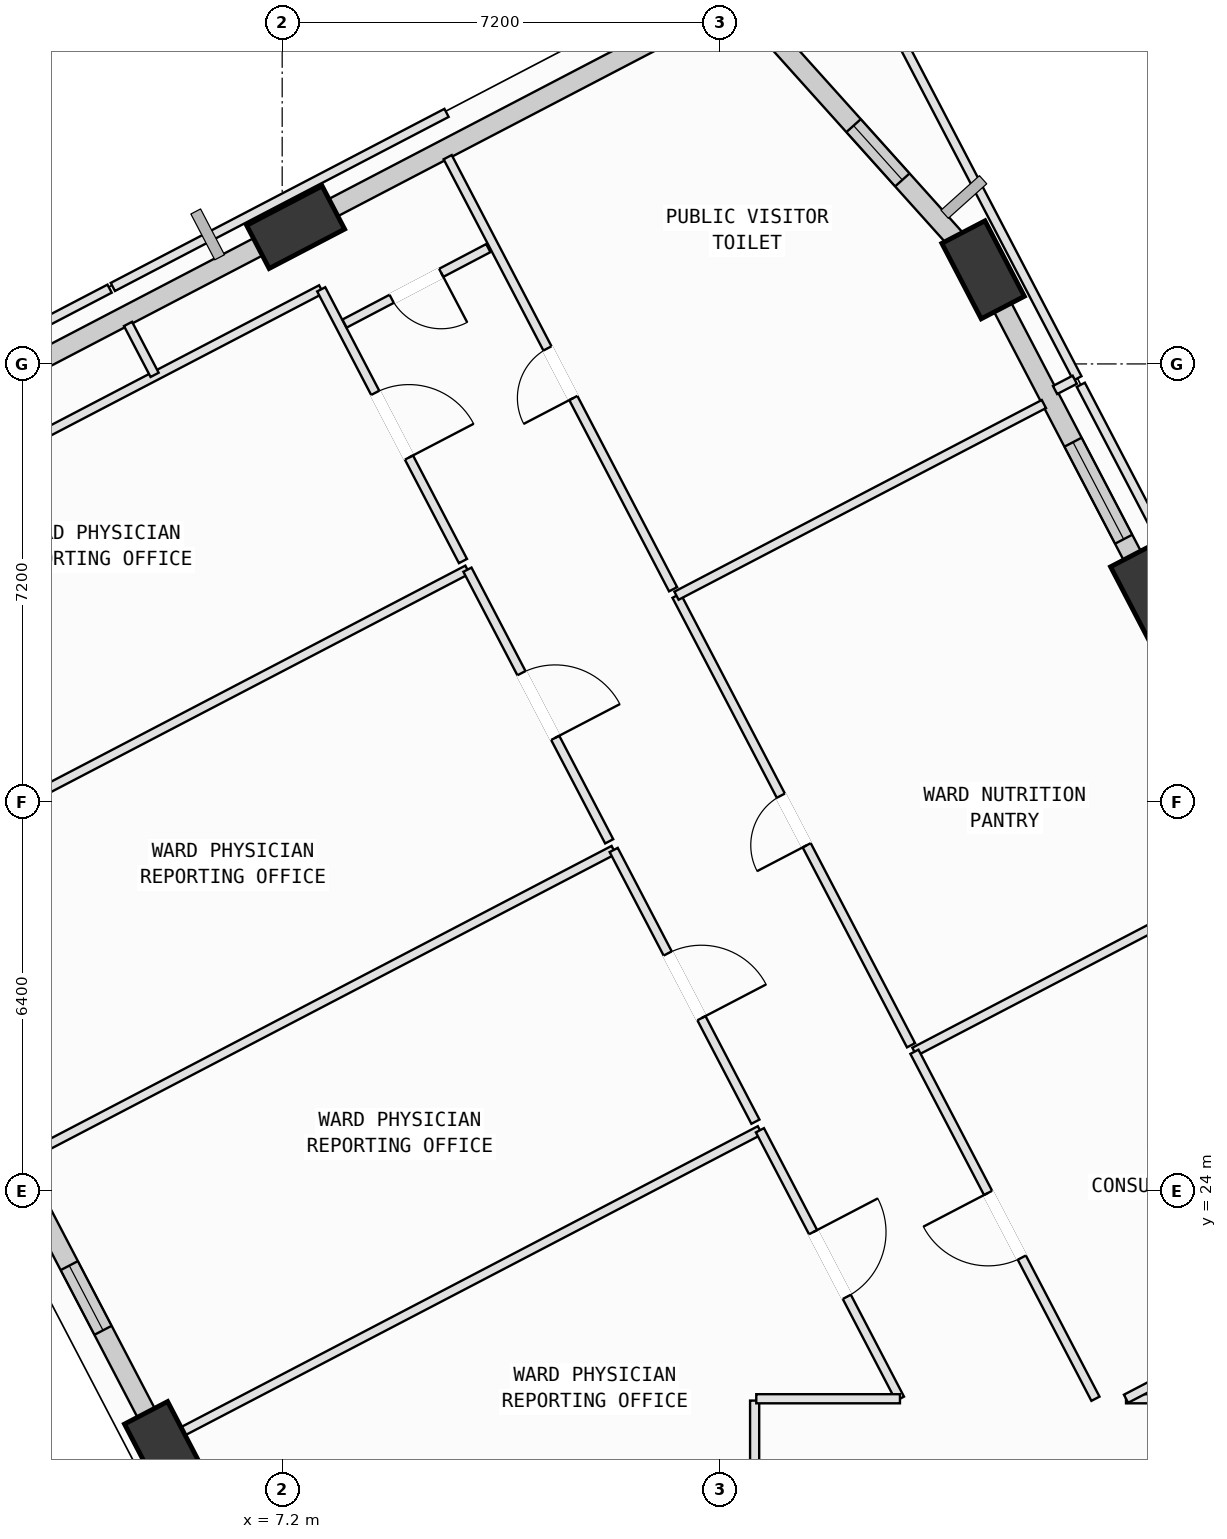
"""IFC4 building model, lengths in metres.
Left out: names, types, materials, properties, quantities, classifications, styles, units other than length and angle.
Written with IfcOpenShell. Run it as: python <this file> out.ifc"""

import sys

from ifc_helpers import new_model, si_unit, direction, frame, frame_2d, origin, origin_2d, place, context, subcontext, project, spatial, rectangle, extrude, element, fill, save


model = new_model("IFC4")
c1 = context("Model", 3, precision=1e-05, world=origin(), true_north=direction((0.0, 1.0)))
c2 = subcontext(c1, "Body", "Model", "MODEL_VIEW")
j1 = project(units=[si_unit("LENGTHUNIT", "METRE"), si_unit("PLANEANGLEUNIT", "RADIAN")], contexts=[c1])
p1 = place(None, origin())
s1 = spatial("IfcSite", under=j1, at=p1, CompositionType="ELEMENT")
p2 = place(p1, origin())
s2 = spatial("IfcBuilding", under=s1, at=p2, CompositionType="ELEMENT")
p3 = place(p2, frame((0.0, 0.0, 140.4)))
s3 = spatial("IfcBuildingStorey", under=s2, at=p3, CompositionType="ELEMENT", Elevation=140.4)
p4 = place(p3, frame((21.502, 33.828, 0.002), z_axis=(-0.036932649589, -0.050396391412, 0.998046182863), x_axis=(0.149987895413, 0.987134715444, 0.055395710969)))
e1 = element("IfcColumn", 1, at=p4, inside=s3, PredefinedType="COLUMN", context=c2, shape_type="SweptSolid", body=[
    extrude(rectangle(XDim=1.4, YDim=0.8, at=origin_2d()), origin(), (0.0, 0.0, 1.0), 3.953),
])
p5 = place(p3, frame((18.727, 39.148, 0.002), z_axis=(-0.058783551583, -0.061942625482, 0.996347130879), x_axis=(0.272586926496, 0.959147545124, 0.075712311991)))
e2 = element("IfcColumn", 2, at=p5, inside=s3, PredefinedType="COLUMN", context=c2, shape_type="SweptSolid", body=[
    extrude(rectangle(XDim=1.4, YDim=0.8, at=origin_2d()), origin(), (0.0, 0.0, 1.0), 3.941),
])
p6 = place(p3, frame((7.421, 39.848, 0.002), z_axis=(-0.06100607157, -0.108138681178, 0.992262205702), x_axis=(0.9977035928, -0.035912424695, 0.057426811397)))
e3 = element("IfcColumn", 3, at=p6, inside=s3, PredefinedType="COLUMN", context=c2, shape_type="SweptSolid", body=[
    extrude(rectangle(XDim=1.4, YDim=0.8, at=origin_2d()), origin(), (0.0, 0.0, 1.0), 3.942),
])
p7 = place(p3, frame((5.285, 19.728, 0.002), z_axis=(0.021879443382, -0.116358857988, 0.992966216004), x_axis=(-0.617245268463, 0.779736515973, 0.104972587944)))
e4 = element("IfcColumn", 4, at=p7, inside=s3, PredefinedType="COLUMN", context=c2, shape_type="SweptSolid", body=[
    extrude(rectangle(XDim=1.4, YDim=0.8, at=origin_2d()), origin(), (0.0, 0.0, 1.0), 3.928),
])
p8 = place(p3, frame((18.97, 38.683, 0.0), z_axis=(0.0, 0.0, 1.0), x_axis=(0.462529637731, -0.886603820328, 0.0)))
e5 = element("IfcWall", 5, at=p8, inside=s3, PredefinedType="SOLIDWALL", context=c2, shape_type="SweptSolid", body=[
    extrude(rectangle(XDim=5.047, YDim=0.32, at=frame_2d((2.523, 0.0))), origin(), (0.0, 0.0, 1.0), 3.085),
])
p9 = place(p8, frame((2.673, 0.0, 0.75)))
e6 = element("IfcOpeningElement", 6, at=p9, cuts=e5, PredefinedType="OPENING", context=c2, shape_type="SweptSolid", body=[
    extrude(rectangle(XDim=1.8, YDim=2.05, at=frame_2d((0.9, 1.025))), frame((0.0, 0.17, 0.0), z_axis=(0.0, -1.0, 0.0), x_axis=(1.0, 0.0, 0.0)), (0.0, 0.0, 1.0), 0.34),
])
p10 = place(p3, frame((14.998, 43.3, 0.0), z_axis=(0.0, 0.0, 1.0), x_axis=(0.66822271705, -0.743961289596, 0.0)))
e7 = element("IfcWall", 7, at=p10, inside=s3, PredefinedType="SOLIDWALL", context=c2, shape_type="SweptSolid", body=[
    extrude(rectangle(XDim=5.128, YDim=0.32, at=frame_2d((2.564, 0.0))), origin(), (0.0, 0.0, 1.0), 3.085),
])
p11 = place(p10, frame((2.393, 0.0, 0.75)))
e8 = element("IfcOpeningElement", 8, at=p11, cuts=e7, PredefinedType="OPENING", context=c2, shape_type="SweptSolid", body=[
    extrude(rectangle(XDim=1.2, YDim=1.75, at=frame_2d((0.6, 0.875))), frame((0.0, 0.17, 0.0), z_axis=(0.0, -1.0, 0.0), x_axis=(1.0, 0.0, 0.0)), (0.0, 0.0, 1.0), 0.34),
])
p12 = place(p3, frame((7.658, 39.972, 0.0), z_axis=(0.0, 0.0, 1.0), x_axis=(0.886603508344, 0.462530235759, 0.0)))
e9 = element("IfcWall", 9, at=p12, inside=s3, PredefinedType="SOLIDWALL", context=c2, shape_type="SweptSolid", body=[
    extrude(rectangle(XDim=7.231, YDim=0.32, at=frame_2d((3.615, 0.0))), origin(), (0.0, 0.0, 1.0), 3.085),
])
p13 = place(p3, frame((0.367, 36.168, 0.0), z_axis=(0.0, 0.0, 1.0), x_axis=(0.886598018627, 0.4625407586, 0.0)))
e10 = element("IfcWall", 10, at=p13, inside=s3, PredefinedType="SOLIDWALL", context=c2, shape_type="SweptSolid", body=[
    extrude(rectangle(XDim=7.27, YDim=0.32, at=frame_2d((3.635, 0.0))), origin(), (0.0, 0.0, 1.0), 3.085),
])
p14 = place(p3, frame((5.163, 19.962, 0.0), z_axis=(0.0, 0.0, 1.0), x_axis=(-0.462505217962, 0.886616559375, 0.0)))
e11 = element("IfcWall", 11, at=p14, inside=s3, PredefinedType="SOLIDWALL", context=c2, shape_type="SweptSolid", body=[
    extrude(rectangle(XDim=5.628, YDim=0.32, at=frame_2d((2.814, 0.0))), origin(), (0.0, 0.0, 1.0), 3.085),
])
p15 = place(p14, frame((1.967, 0.0, 0.75)))
e12 = element("IfcOpeningElement", 12, at=p15, cuts=e11, PredefinedType="OPENING", context=c2, shape_type="SweptSolid", body=[
    extrude(rectangle(XDim=1.2, YDim=1.75, at=frame_2d((0.6, 0.875))), frame((0.0, 0.17, 0.0), z_axis=(0.0, -1.0, 0.0), x_axis=(1.0, 0.0, 0.0)), (0.0, 0.0, 1.0), 0.34),
])
p16 = place(p3, frame((14.97, 20.55, 0.0), z_axis=(0.0, 0.0, 1.0), x_axis=(0.0, -1.0, 0.0)))
e13 = element("IfcWall", 13, at=p16, inside=s3, PredefinedType="PARTITIONING", context=c2, shape_type="SweptSolid", body=[
    extrude(rectangle(XDim=1.284, YDim=0.15, at=frame_2d((0.642, 0.0))), origin(), (0.0, 0.0, 1.0), 2.885),
])
p17 = place(p3, frame((5.414, 18.984, 0.0), z_axis=(0.0, 0.0, 1.0), x_axis=(-0.462422071375, 0.886659927991, 0.0)))
e14 = element("IfcWall", 14, at=p17, inside=s3, PredefinedType="PARTITIONING", context=c2, shape_type="SweptSolid", body=[
    extrude(rectangle(XDim=0.87, YDim=0.15, at=frame_2d((0.435, 0.0))), origin(), (0.0, 0.0, 1.0), 3.085),
])
p18 = place(p3, frame((5.28, 19.895, 0.0), z_axis=(0.0, 0.0, 1.0), x_axis=(0.886580898603, 0.462573572777, 0.0)))
e15 = element("IfcWall", 15, at=p18, inside=s3, PredefinedType="PARTITIONING", context=c2, shape_type="SweptSolid", body=[
    extrude(rectangle(XDim=11.028, YDim=0.15, at=frame_2d((5.514, 0.0))), origin(), (0.0, 0.0, 1.0), 3.7),
])
p19 = place(p3, frame((15.057, 24.996, 0.0), z_axis=(0.0, 0.0, 1.0), x_axis=(0.462442035221, -0.886649515908, 0.0)))
e16 = element("IfcWall", 16, at=p19, inside=s3, PredefinedType="PARTITIONING", context=c2, shape_type="SweptSolid", body=[
    extrude(rectangle(XDim=4.98, YDim=0.15, at=frame_2d((2.49, 0.0))), origin(), (0.0, 0.0, 1.0), 3.7),
])
p20 = place(p19, frame((1.89, 0.0, 0.0)))
e17 = element("IfcOpeningElement", 17, at=p20, cuts=e16, PredefinedType="OPENING", context=c2, shape_type="SweptSolid", body=[
    extrude(rectangle(XDim=1.2, YDim=2.15, at=frame_2d((0.6, 1.075))), frame((0.0, 0.085, 0.0), z_axis=(0.0, -1.0, 0.0), x_axis=(1.0, 0.0, 0.0)), (0.0, 0.0, 1.0), 0.17),
])
p21 = place(p3, frame((17.36, 20.58, 0.0), z_axis=(0.0, 0.0, 1.0), x_axis=(-1.0, 0.0, 0.0)))
e18 = element("IfcWall", 18, at=p21, inside=s3, PredefinedType="PARTITIONING", context=c2, shape_type="SweptSolid", body=[
    extrude(rectangle(XDim=2.363, YDim=0.15, at=frame_2d((1.182, 0.0))), origin(), (0.0, 0.0, 1.0), 3.7),
])
p22 = place(p3, frame((2.93, 24.534, 0.0), z_axis=(0.0, 0.0, 1.0), x_axis=(0.886600327973, 0.462536332019, 0.0)))
e19 = element("IfcWall", 19, at=p22, inside=s3, PredefinedType="PARTITIONING", context=c2, shape_type="SweptSolid", body=[
    extrude(rectangle(XDim=10.966, YDim=0.15, at=frame_2d((5.483, 0.0))), origin(), (0.0, 0.0, 1.0), 3.285),
])
p23 = place(p3, frame((12.652, 29.606, 0.0), z_axis=(0.0, 0.0, 1.0), x_axis=(0.462435226927, -0.886653066817, 0.0)))
e20 = element("IfcWall", 20, at=p23, inside=s3, PredefinedType="PARTITIONING", context=c2, shape_type="SweptSolid", body=[
    extrude(rectangle(XDim=5.04, YDim=0.15, at=frame_2d((2.52, 0.0))), origin(), (0.0, 0.0, 1.0), 3.7),
])
p24 = place(p23, frame((1.92, 0.0, 0.0)))
e21 = element("IfcOpeningElement", 21, at=p24, cuts=e20, PredefinedType="OPENING", context=c2, shape_type="SweptSolid", body=[
    extrude(rectangle(XDim=1.2, YDim=2.15, at=frame_2d((0.6, 1.075))), frame((0.0, 0.085, 0.0), z_axis=(0.0, -1.0, 0.0), x_axis=(1.0, 0.0, 0.0)), (0.0, 0.0, 1.0), 0.17),
])
p25 = place(p3, frame((0.525, 29.145, 0.0), z_axis=(0.0, 0.0, 1.0), x_axis=(0.886636847368, 0.462466324059, 0.0)))
e22 = element("IfcWall", 22, at=p25, inside=s3, PredefinedType="PARTITIONING", context=c2, shape_type="SweptSolid", body=[
    extrude(rectangle(XDim=10.965, YDim=0.15, at=frame_2d((5.483, 0.0))), origin(), (0.0, 0.0, 1.0), 3.7),
])
p26 = place(p3, frame((10.247, 34.216, 0.0), z_axis=(0.0, 0.0, 1.0), x_axis=(0.462514680435, -0.886611623194, 0.0)))
e23 = element("IfcWall", 23, at=p26, inside=s3, PredefinedType="PARTITIONING", context=c2, shape_type="SweptSolid", body=[
    extrude(rectangle(XDim=5.04, YDim=0.15, at=frame_2d((2.52, 0.0))), origin(), (0.0, 0.0, 1.0), 3.7),
])
p27 = place(p26, frame((1.92, 0.0, 0.0)))
e24 = element("IfcOpeningElement", 24, at=p27, cuts=e23, PredefinedType="OPENING", context=c2, shape_type="SweptSolid", body=[
    extrude(rectangle(XDim=1.2, YDim=2.15, at=frame_2d((0.6, 1.075))), frame((0.0, 0.085, 0.0), z_axis=(0.0, -1.0, 0.0), x_axis=(1.0, 0.0, 0.0)), (0.0, 0.0, 1.0), 0.17),
])
p28 = place(p3, frame((0.052, 34.763, 0.0), z_axis=(0.0, 0.0, 1.0), x_axis=(0.88660367237, 0.462529921345, 0.0)))
e25 = element("IfcWall", 25, at=p28, inside=s3, PredefinedType="PARTITIONING", context=c2, shape_type="SweptSolid", body=[
    extrude(rectangle(XDim=8.786, YDim=0.15, at=frame_2d((4.393, 0.0))), origin(), (0.0, 0.0, 1.0), 3.7),
])
p29 = place(p3, frame((7.842, 38.827, 0.0), z_axis=(0.0, 0.0, 1.0), x_axis=(0.462473305165, -0.886633206016, 0.0)))
e26 = element("IfcWall", 26, at=p29, inside=s3, PredefinedType="PARTITIONING", context=c2, shape_type="SweptSolid", body=[
    extrude(rectangle(XDim=5.041, YDim=0.15, at=frame_2d((2.52, 0.0))), origin(), (0.0, 0.0, 1.0), 2.885),
])
p30 = place(p29, frame((1.92, 0.0, 0.0)))
e27 = element("IfcOpeningElement", 27, at=p30, cuts=e26, PredefinedType="OPENING", context=c2, shape_type="SweptSolid", body=[
    extrude(rectangle(XDim=1.2, YDim=2.15, at=frame_2d((0.6, 1.075))), frame((0.0, 0.085, 0.0), z_axis=(0.0, -1.0, 0.0), x_axis=(1.0, 0.0, 0.0)), (0.0, 0.0, 1.0), 0.17),
])
p31 = place(p3, frame((27.594, 20.58, 0.0), z_axis=(0.0, 0.0, 1.0), x_axis=(-1.0, 0.0, 0.0)))
e28 = element("IfcWall", 28, at=p31, inside=s3, PredefinedType="PARTITIONING", context=c2, shape_type="SweptSolid", body=[
    extrude(rectangle(XDim=6.516, YDim=0.15, at=frame_2d((3.258, 0.0))), origin(), (0.0, 0.0, 1.0), 3.7),
])
p32 = place(p31, frame((2.758, 0.0, 0.0)))
e29 = element("IfcOpeningElement", 29, at=p32, cuts=e28, PredefinedType="OPENING", context=c2, shape_type="SweptSolid", body=[
    extrude(rectangle(XDim=1.0, YDim=2.12, at=frame_2d((0.5, 1.06))), frame((0.0, 0.085, 0.0), z_axis=(0.0, -1.0, 0.0), x_axis=(1.0, 0.0, 0.0)), (0.0, 0.0, 1.0), 0.17),
])
p33 = place(p3, frame((21.078, 20.58, 0.0), z_axis=(0.0, 0.0, 1.0), x_axis=(0.886630926341, 0.46247767563, 0.0)))
e30 = element("IfcWall", 30, at=p33, inside=s3, PredefinedType="PARTITIONING", context=c2, shape_type="SweptSolid", body=[
    extrude(rectangle(XDim=6.045, YDim=0.15, at=frame_2d((3.023, 0.0))), origin(), (0.0, 0.0, 1.0), 3.7),
])
p34 = place(p3, frame((17.598, 26.287, 0.0), z_axis=(0.0, 0.0, 1.0), x_axis=(0.886614228897, 0.462509685431, 0.0)))
e31 = element("IfcWall", 31, at=p34, inside=s3, PredefinedType="PARTITIONING", context=c2, shape_type="SweptSolid", body=[
    extrude(rectangle(XDim=6.815, YDim=0.15, at=frame_2d((3.407, 0.0))), origin(), (0.0, 0.0, 1.0), 3.7),
])
p35 = place(p3, frame((20.575, 20.58, 0.0), z_axis=(0.0, 0.0, 1.0), x_axis=(-0.462501194351, 0.886618658288, 0.0)))
e32 = element("IfcWall", 32, at=p35, inside=s3, PredefinedType="PARTITIONING", context=c2, shape_type="SweptSolid", body=[
    extrude(rectangle(XDim=6.437, YDim=0.15, at=frame_2d((3.218, 0.0))), origin(), (0.0, 0.0, 1.0), 3.7),
])
p36 = place(p35, frame((2.618, 0.0, 0.0)))
e33 = element("IfcOpeningElement", 33, at=p36, cuts=e32, PredefinedType="OPENING", context=c2, shape_type="SweptSolid", body=[
    extrude(rectangle(XDim=1.2, YDim=2.15, at=frame_2d((0.6, 1.075))), frame((0.0, 0.085, 0.0), z_axis=(0.0, -1.0, 0.0), x_axis=(1.0, 0.0, 0.0)), (0.0, 0.0, 1.0), 0.17),
])
p37 = place(p3, frame((17.542, 26.394, 0.0), z_axis=(0.0, 0.0, 1.0), x_axis=(-0.46248796698, 0.886625558169, 0.0)))
e34 = element("IfcWall", 34, at=p37, inside=s3, PredefinedType="PARTITIONING", context=c2, shape_type="SweptSolid", body=[
    extrude(rectangle(XDim=8.34, YDim=0.15, at=frame_2d((4.17, 0.0))), origin(), (0.0, 0.0, 1.0), 3.7),
])
p38 = place(p37, frame((3.71, 0.0, 0.0)))
e35 = element("IfcOpeningElement", 35, at=p38, cuts=e34, PredefinedType="OPENING", context=c2, shape_type="SweptSolid", body=[
    extrude(rectangle(XDim=0.92, YDim=2.1, at=frame_2d((0.46, 1.05))), frame((0.0, 0.085, 0.0), z_axis=(0.0, -1.0, 0.0), x_axis=(1.0, 0.0, 0.0)), (0.0, 0.0, 1.0), 0.17),
])
p39 = place(p3, frame((13.685, 33.788, 0.0), z_axis=(0.0, 0.0, 1.0), x_axis=(0.886614228897, 0.462509685431, 0.0)))
e36 = element("IfcWall", 36, at=p39, inside=s3, PredefinedType="PARTITIONING", context=c2, shape_type="SweptSolid", body=[
    extrude(rectangle(XDim=6.815, YDim=0.15, at=frame_2d((3.407, 0.0))), origin(), (0.0, 0.0, 1.0), 3.7),
])
p40 = place(p3, frame((20.334, 37.257, 0.0), z_axis=(0.0, 0.0, 1.0), x_axis=(0.462531995197, -0.886602590465, 0.0)))
e37 = element("IfcWall", 37, at=p40, inside=s3, PredefinedType="PARTITIONING", context=c2, shape_type="SweptSolid", body=[
    extrude(rectangle(XDim=8.341, YDim=0.15, at=frame_2d((4.17, 0.0))), origin(), (0.0, 0.0, 1.0), 3.7),
])
p41 = place(p3, frame((16.949, 43.747, 0.0), z_axis=(0.0, 0.0, 1.0), x_axis=(0.462487208348, -0.886625953892, 0.0)))
e38 = element("IfcWall", 38, at=p41, inside=s3, PredefinedType="PARTITIONING", context=c2, shape_type="SweptSolid", body=[
    extrude(rectangle(XDim=7.2, YDim=0.15, at=frame_2d((3.6, 0.0))), origin(), (0.0, 0.0, 1.0), 3.7),
])
p42 = place(p3, frame((20.235, 37.34, 0.0), z_axis=(0.0, 0.0, 1.0), x_axis=(-0.886549133333, -0.462634449849, 0.0)))
e39 = element("IfcWall", 39, at=p42, inside=s3, PredefinedType="PARTITIONING", context=c2, shape_type="SweptSolid", body=[
    extrude(rectangle(XDim=0.366, YDim=0.15, at=frame_2d((0.183, 0.0))), origin(), (0.0, 0.0, 1.0), 3.7),
])
p43 = place(p3, frame((13.629, 33.894, 0.0), z_axis=(0.0, 0.0, 1.0), x_axis=(-0.462450459837, 0.886645121904, 0.0)))
e40 = element("IfcWall", 40, at=p43, inside=s3, PredefinedType="PARTITIONING", context=c2, shape_type="SweptSolid", body=[
    extrude(rectangle(XDim=8.016, YDim=0.15, at=frame_2d((4.008, 0.0))), origin(), (0.0, 0.0, 1.0), 3.7),
])
p44 = place(p43, frame((3.548, 0.0, 0.0)))
e41 = element("IfcOpeningElement", 41, at=p44, cuts=e40, PredefinedType="OPENING", context=c2, shape_type="SweptSolid", body=[
    extrude(rectangle(XDim=0.92, YDim=2.1, at=frame_2d((0.46, 1.05))), frame((0.0, 0.085, 0.0), z_axis=(0.0, -1.0, 0.0), x_axis=(1.0, 0.0, 0.0)), (0.0, 0.0, 1.0), 0.17),
])
p45 = place(p3, frame((4.665, 38.258, 0.0), z_axis=(0.0, 0.0, 1.0), x_axis=(0.462336486669, -0.886704557953, 0.0)))
e42 = element("IfcWall", 42, at=p45, inside=s3, PredefinedType="PARTITIONING", context=c2, shape_type="SweptSolid", body=[
    extrude(rectangle(XDim=0.945, YDim=0.15, at=frame_2d((0.473, 0.0))), origin(), (0.0, 0.0, 1.0), 3.7),
])
p46 = place(p3, frame((-0.577, 36.262, 0.0), z_axis=(0.0, 0.0, 1.0), x_axis=(0.886652826293, 0.462435688098, 0.0)))
e43 = element("IfcWall", 43, at=p46, inside=s3, PredefinedType="PARTITIONING", context=c2, shape_type="SweptSolid", body=[
    extrude(rectangle(XDim=5.57, YDim=0.15, at=frame_2d((2.785, 0.0))), origin(), (0.0, 0.0, 1.0), 3.7),
])
p47 = place(p3, frame((4.415, 38.866, 0.0), z_axis=(0.0, 0.0, 1.0), x_axis=(0.886603833565, 0.462529612359, 0.0)))
e44 = element("IfcWall", 44, at=p47, inside=s3, PredefinedType="PARTITIONING", context=c2, shape_type="SweptSolid", body=[
    extrude(rectangle(XDim=6.19, YDim=0.15, at=frame_2d((3.095, 0.0))), origin(), (0.0, 0.0, 1.0), 3.7),
])
p48 = place(p3, frame((10.59, 39.505, 0.0), z_axis=(0.0, 0.0, 1.0), x_axis=(-0.885419541183, -0.464792680764, 0.0)))
e45 = element("IfcWall", 45, at=p48, inside=s3, PredefinedType="PARTITIONING", context=c2, shape_type="SweptSolid", body=[
    extrude(rectangle(XDim=2.67, YDim=0.15, at=frame_2d((1.335, 0.0))), origin(), (0.0, 0.0, 1.0), 3.7),
])
p49 = place(p48, frame((0.875, 0.0, 0.0)))
e46 = element("IfcOpeningElement", 46, at=p49, cuts=e45, PredefinedType="OPENING", context=c2, shape_type="SweptSolid", body=[
    extrude(rectangle(XDim=0.92, YDim=2.1, at=frame_2d((0.46, 1.05))), frame((0.0, 0.085, 0.0), z_axis=(0.0, -1.0, 0.0), x_axis=(1.0, 0.0, 0.0)), (0.0, 0.0, 1.0), 0.17),
])
p50 = place(p9, origin())
e47 = element("IfcWindow", 47, at=p50, inside=s3, PartitioningType="SINGLE_PANEL", PredefinedType="WINDOW", context=c2, shape_type="SweptSolid", body=[
    extrude(rectangle(XDim=1.8, YDim=2.05, at=frame_2d((0.9, 1.025))), frame((0.0, 0.03, 0.0), z_axis=(0.0, -1.0, 0.0), x_axis=(1.0, 0.0, 0.0)), (0.0, 0.0, 1.0), 0.06),
])
fill(e6, e47)
p51 = place(p11, origin())
e48 = element("IfcWindow", 48, at=p51, inside=s3, PartitioningType="SINGLE_PANEL", PredefinedType="WINDOW", context=c2, shape_type="SweptSolid", body=[
    extrude(rectangle(XDim=1.2, YDim=1.75, at=frame_2d((0.6, 0.875))), frame((0.0, 0.03, 0.0), z_axis=(0.0, -1.0, 0.0), x_axis=(1.0, 0.0, 0.0)), (0.0, 0.0, 1.0), 0.06),
])
fill(e8, e48)
p52 = place(p15, origin())
e49 = element("IfcWindow", 49, at=p52, inside=s3, PartitioningType="SINGLE_PANEL", PredefinedType="WINDOW", context=c2, shape_type="SweptSolid", body=[
    extrude(rectangle(XDim=1.2, YDim=1.75, at=frame_2d((0.6, 0.875))), frame((0.0, 0.03, 0.0), z_axis=(0.0, -1.0, 0.0), x_axis=(1.0, 0.0, 0.0)), (0.0, 0.0, 1.0), 0.06),
])
fill(e12, e49)
p53 = place(p20, origin())
e50 = element("IfcDoor", 50, at=p53, inside=s3, OperationType="SINGLE_SWING_LEFT", PredefinedType="DOOR", context=c2, shape_type="SweptSolid", body=[
    extrude(rectangle(XDim=1.2, YDim=2.15, at=frame_2d((0.6, 1.075))), frame((0.0, 0.025, 0.0), z_axis=(0.0, -1.0, 0.0), x_axis=(1.0, 0.0, 0.0)), (0.0, 0.0, 1.0), 0.05),
])
fill(e17, e50)
p54 = place(p24, origin())
e51 = element("IfcDoor", 51, at=p54, inside=s3, OperationType="SINGLE_SWING_RIGHT", PredefinedType="DOOR", context=c2, shape_type="SweptSolid", body=[
    extrude(rectangle(XDim=1.2, YDim=2.15, at=frame_2d((0.6, 1.075))), frame((0.0, 0.025, 0.0), z_axis=(0.0, -1.0, 0.0), x_axis=(1.0, 0.0, 0.0)), (0.0, 0.0, 1.0), 0.05),
])
fill(e21, e51)
p55 = place(p27, origin())
e52 = element("IfcDoor", 52, at=p55, inside=s3, OperationType="SINGLE_SWING_RIGHT", PredefinedType="DOOR", context=c2, shape_type="SweptSolid", body=[
    extrude(rectangle(XDim=1.2, YDim=2.15, at=frame_2d((0.6, 1.075))), frame((0.0, 0.025, 0.0), z_axis=(0.0, -1.0, 0.0), x_axis=(1.0, 0.0, 0.0)), (0.0, 0.0, 1.0), 0.05),
])
fill(e24, e52)
p56 = place(p30, origin())
e53 = element("IfcDoor", 53, at=p56, inside=s3, OperationType="SINGLE_SWING_RIGHT", PredefinedType="DOOR", context=c2, shape_type="SweptSolid", body=[
    extrude(rectangle(XDim=1.2, YDim=2.15, at=frame_2d((0.6, 1.075))), frame((0.0, 0.025, 0.0), z_axis=(0.0, -1.0, 0.0), x_axis=(1.0, 0.0, 0.0)), (0.0, 0.0, 1.0), 0.05),
])
fill(e27, e53)
p57 = place(p36, origin())
e54 = element("IfcDoor", 54, at=p57, inside=s3, OperationType="SINGLE_SWING_RIGHT", PredefinedType="DOOR", context=c2, shape_type="SweptSolid", body=[
    extrude(rectangle(XDim=1.2, YDim=2.15, at=frame_2d((0.6, 1.075))), frame((0.0, 0.025, 0.0), z_axis=(0.0, -1.0, 0.0), x_axis=(1.0, 0.0, 0.0)), (0.0, 0.0, 1.0), 0.05),
])
fill(e33, e54)
p58 = place(p38, origin())
e55 = element("IfcDoor", 55, at=p58, inside=s3, OperationType="SINGLE_SWING_LEFT", PredefinedType="DOOR", context=c2, shape_type="SweptSolid", body=[
    extrude(rectangle(XDim=0.92, YDim=2.1, at=frame_2d((0.46, 1.05))), frame((0.0, 0.025, 0.0), z_axis=(0.0, -1.0, 0.0), x_axis=(1.0, 0.0, 0.0)), (0.0, 0.0, 1.0), 0.05),
])
fill(e35, e55)
p59 = place(p44, origin())
e56 = element("IfcDoor", 56, at=p59, inside=s3, OperationType="SINGLE_SWING_LEFT", PredefinedType="DOOR", context=c2, shape_type="SweptSolid", body=[
    extrude(rectangle(XDim=0.92, YDim=2.1, at=frame_2d((0.46, 1.05))), frame((0.0, 0.025, 0.0), z_axis=(0.0, -1.0, 0.0), x_axis=(1.0, 0.0, 0.0)), (0.0, 0.0, 1.0), 0.05),
])
fill(e41, e56)
p60 = place(p49, origin())
e57 = element("IfcDoor", 57, at=p60, inside=s3, OperationType="SINGLE_SWING_LEFT", PredefinedType="DOOR", context=c2, shape_type="SweptSolid", body=[
    extrude(rectangle(XDim=0.92, YDim=2.1, at=frame_2d((0.46, 1.05))), frame((0.0, 0.025, 0.0), z_axis=(0.0, -1.0, 0.0), x_axis=(1.0, 0.0, 0.0)), (0.0, 0.0, 1.0), 0.05),
])
fill(e46, e57)
save(model, sys.argv[1])
